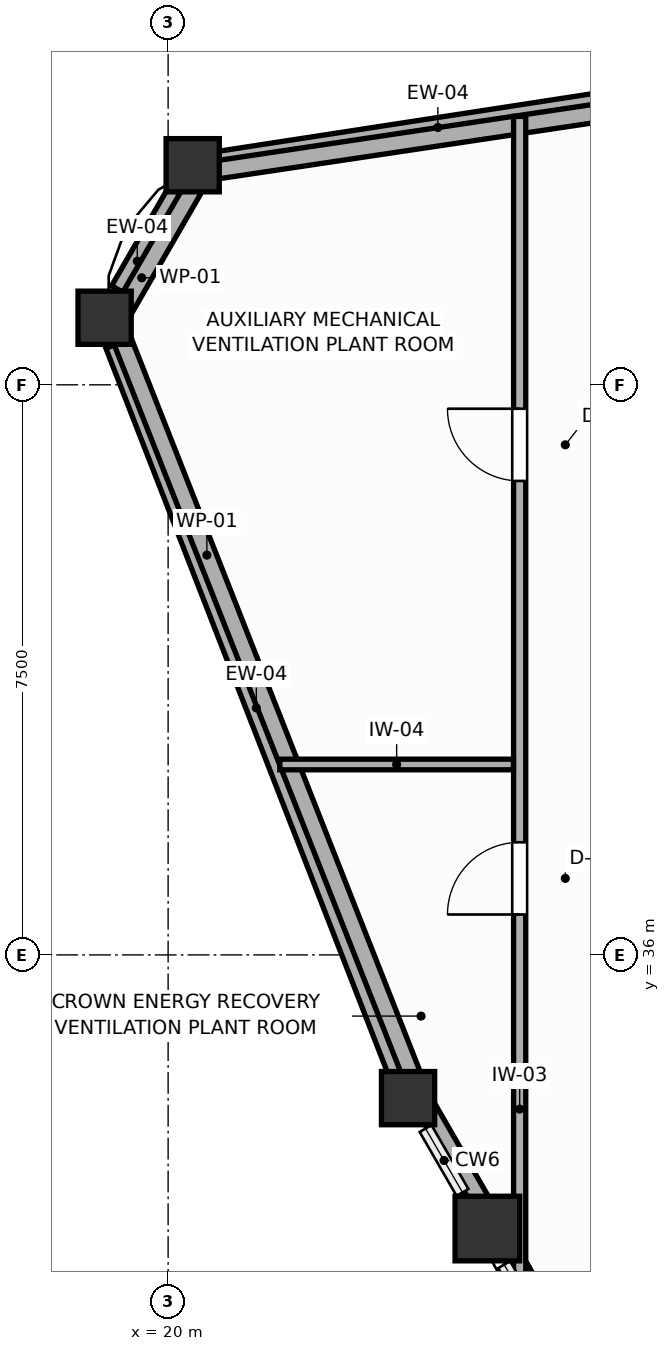
"""IFC4 building model, lengths in metres.
Left out: names, types, materials, properties, quantities, classifications, styles, units other than length and angle.
Written with IfcOpenShell. Run it as: python <this file> out.ifc"""

import sys

from ifc_helpers import new_model, si_unit, direction, frame, frame_2d, origin, origin_2d, place, context, subcontext, project, spatial, rectangle, extrude, source, transform, mapped, element, fill, save


model = new_model("IFC4")
c1 = context("Model", 3, precision=1e-05, world=origin(), true_north=direction((0.0, 1.0)))
c2 = subcontext(c1, "Body", "Model", "MODEL_VIEW")
j1 = project(units=[si_unit("LENGTHUNIT", "METRE"), si_unit("PLANEANGLEUNIT", "RADIAN")], contexts=[c1])
p1 = place(None, origin())
s1 = spatial("IfcSite", under=j1, at=p1, CompositionType="ELEMENT")
p2 = place(p1, origin())
s2 = spatial("IfcBuilding", under=s1, at=p2, CompositionType="ELEMENT")
p3 = place(p2, frame((0.0, 0.0, 296.1)))
s3 = spatial("IfcBuildingStorey", under=s2, at=p3, CompositionType="ELEMENT", Elevation=296.1)
m1 = source(origin(), c2, "Body", "SweptSolid", [
    extrude(rectangle(XDim=0.85, YDim=0.85, at=origin_2d()), origin(), (0.0, 0.0, 1.0), 3.6),
])
p4 = place(p3, frame((24.2, 32.4, 0.0), z_axis=(0.0, 0.0, 1.0), x_axis=(1.0, 0.0, 0.0)))
e1 = element("IfcColumn", 1, at=p4, inside=s3, PredefinedType="COLUMN", context=c2, shape_type="MappedRepresentation", body=[
    mapped(m1, transform((0.0, 0.0, 0.0), scale=1.0)),
])
m2 = source(origin(), c2, "Body", "SweptSolid", [
    extrude(rectangle(XDim=0.7, YDim=0.7, at=origin_2d()), origin(), (0.0, 0.0, 1.0), 3.6),
])
for number, where, z_axis, x_axis in (
    (2, (20.323, 46.389, 0.0), (0.0, 0.0, 1.0), (1.0, 0.0, 0.0)),
    (3, (19.165, 44.382, 0.0), (0.0, 0.0, 1.0), (1.0, 0.0, 0.0)),
    (4, (23.156, 34.115, 0.0), (0.0, 0.0, 1.0), (1.0, 0.0, 0.0)),
):
    element("IfcColumn", number, at=place(p3, frame(where, z_axis=z_axis, x_axis=x_axis)), inside=s3, PredefinedType="COLUMN", context=c2, shape_type="MappedRepresentation", body=[
        mapped(m2, transform((0.0, 0.0, 0.0), scale=1.0)),
    ])
p5 = place(p3, frame((26.42, 47.327, 0.0), z_axis=(0.0, 0.0, 1.0), x_axis=(-0.98836100704, -0.152126656979, 0.0)))
e5 = element("IfcWall", 5, at=p5, inside=s3, PredefinedType="SOLIDWALL", context=c2, shape_type="SweptSolid", body=[
    extrude(rectangle(XDim=5.81, YDim=0.26, at=frame_2d((2.905, 0.0))), origin(), (0.0, 0.0, 1.0), 3.01),
])
p6 = place(p3, frame((20.118, 46.034, 0.0), z_axis=(0.0, 0.0, 1.0), x_axis=(-0.500033033937, -0.866006330792, 0.0)))
e6 = element("IfcWall", 6, at=p6, inside=s3, PredefinedType="SOLIDWALL", context=c2, shape_type="SweptSolid", body=[
    extrude(rectangle(XDim=1.497, YDim=0.26, at=frame_2d((0.749, 0.0))), origin(), (0.0, 0.0, 1.0), 3.01),
])
p7 = place(p3, frame((19.302, 44.027, 0.0), z_axis=(0.0, 0.0, 1.0), x_axis=(0.362411790687, -0.93201807599, 0.0)))
e7 = element("IfcWall", 7, at=p7, inside=s3, PredefinedType="SOLIDWALL", context=c2, shape_type="SweptSolid", body=[
    extrude(rectangle(XDim=10.254, YDim=0.26, at=frame_2d((5.127, 0.0))), origin(), (0.0, 0.0, 1.0), 3.01),
])
p8 = place(p3, frame((31.269, 47.916, 3.6), z_axis=(0.0, 0.0, 1.0), x_axis=(-0.989016466777, -0.147805373529, 0.0)))
e8 = element("IfcWall", 8, at=p8, inside=s3, PredefinedType="PARAPET", context=c2, shape_type="SweptSolid", body=[
    extrude(rectangle(XDim=10.933, YDim=0.24, at=frame_2d((5.467, 0.0))), origin(), (0.0, 0.0, 1.0), 0.24),
])
p9 = place(p3, frame((20.456, 46.3, 3.6), z_axis=(0.0, 0.0, 1.0), x_axis=(-0.500059783319, -0.865990885118, 0.0)))
e9 = element("IfcWall", 9, at=p9, inside=s3, PredefinedType="PARAPET", context=c2, shape_type="SweptSolid", body=[
    extrude(rectangle(XDim=2.297, YDim=0.24, at=frame_2d((1.148, 0.0))), origin(), (0.0, 0.0, 1.0), 0.24),
])
p10 = place(p3, frame((19.308, 44.311, 3.6), z_axis=(0.0, 0.0, 1.0), x_axis=(0.366515145825, -0.930412084982, 0.0)))
e10 = element("IfcWall", 10, at=p10, inside=s3, PredefinedType="PARAPET", context=c2, shape_type="SweptSolid", body=[
    extrude(rectangle(XDim=10.933, YDim=0.24, at=frame_2d((5.466, 0.0))), origin(), (0.0, 0.0, 1.0), 0.24),
])
p11 = place(p3, frame((23.315, 34.139, 3.6), z_axis=(0.0, 0.0, 1.0), x_axis=(0.500007603729, -0.866021013725, 0.0)))
e11 = element("IfcWall", 11, at=p11, inside=s3, PredefinedType="PARAPET", context=c2, shape_type="SweptSolid", body=[
    extrude(rectangle(XDim=9.462, YDim=0.24, at=frame_2d((4.731, 0.0))), origin(), (0.0, 0.0, 1.0), 0.24),
])
p12 = place(p3, frame((24.625, 31.592, 0.0), z_axis=(0.0, 0.0, 1.0), x_axis=(0.0, 1.0, 0.0)))
e12 = element("IfcWall", 12, at=p12, inside=s3, PredefinedType="PARTITIONING", context=c2, shape_type="SweptSolid", body=[
    extrude(rectangle(XDim=15.439, YDim=0.16, at=frame_2d((7.719, 0.0))), origin(), (0.0, 0.0, 1.0), 3.34),
])
p13 = place(p12, frame((4.939, 0.0, 0.0)))
e13 = element("IfcOpeningElement", 13, at=p13, cuts=e12, PredefinedType="OPENING", context=c2, shape_type="SweptSolid", body=[
    extrude(rectangle(XDim=0.95, YDim=2.05, at=frame_2d((0.475, 1.025))), frame((0.0, 0.09, 0.0), z_axis=(0.0, -1.0, 0.0), x_axis=(1.0, 0.0, 0.0)), (0.0, 0.0, 1.0), 0.18),
])
p14 = place(p12, frame((10.643, 0.0, 0.0)))
e14 = element("IfcOpeningElement", 14, at=p14, cuts=e12, PredefinedType="OPENING", context=c2, shape_type="SweptSolid", body=[
    extrude(rectangle(XDim=0.95, YDim=2.05, at=frame_2d((0.475, 1.025))), frame((0.0, 0.09, 0.0), z_axis=(0.0, -1.0, 0.0), x_axis=(1.0, 0.0, 0.0)), (0.0, 0.0, 1.0), 0.18),
])
p15 = place(p3, frame((21.47, 38.505, 0.0), z_axis=(0.0, 0.0, 1.0), x_axis=(1.0, 0.0, 0.0)))
e15 = element("IfcWall", 15, at=p15, inside=s3, PredefinedType="PARTITIONING", context=c2, shape_type="SweptSolid", body=[
    extrude(rectangle(XDim=3.073, YDim=0.14, at=frame_2d((1.537, 0.0))), origin(), (0.0, 0.0, 1.0), 3.34),
])
p16 = place(p13, origin())
e16 = element("IfcDoor", 16, at=p16, inside=s3, OperationType="SINGLE_SWING_LEFT", PredefinedType="DOOR", context=c2, shape_type="SweptSolid", body=[
    extrude(rectangle(XDim=0.95, YDim=2.05, at=frame_2d((0.475, 1.025))), frame((0.0, 0.025, 0.0), z_axis=(0.0, -1.0, 0.0), x_axis=(1.0, 0.0, 0.0)), (0.0, 0.0, 1.0), 0.05),
])
fill(e13, e16)
p17 = place(p14, origin())
e17 = element("IfcDoor", 17, at=p17, inside=s3, OperationType="SINGLE_SWING_RIGHT", PredefinedType="DOOR", context=c2, shape_type="SweptSolid", body=[
    extrude(rectangle(XDim=0.95, YDim=2.05, at=frame_2d((0.475, 1.025))), frame((0.0, 0.025, 0.0), z_axis=(0.0, -1.0, 0.0), x_axis=(1.0, 0.0, 0.0)), (0.0, 0.0, 1.0), 0.05),
])
fill(e14, e17)
save(model, sys.argv[1])
